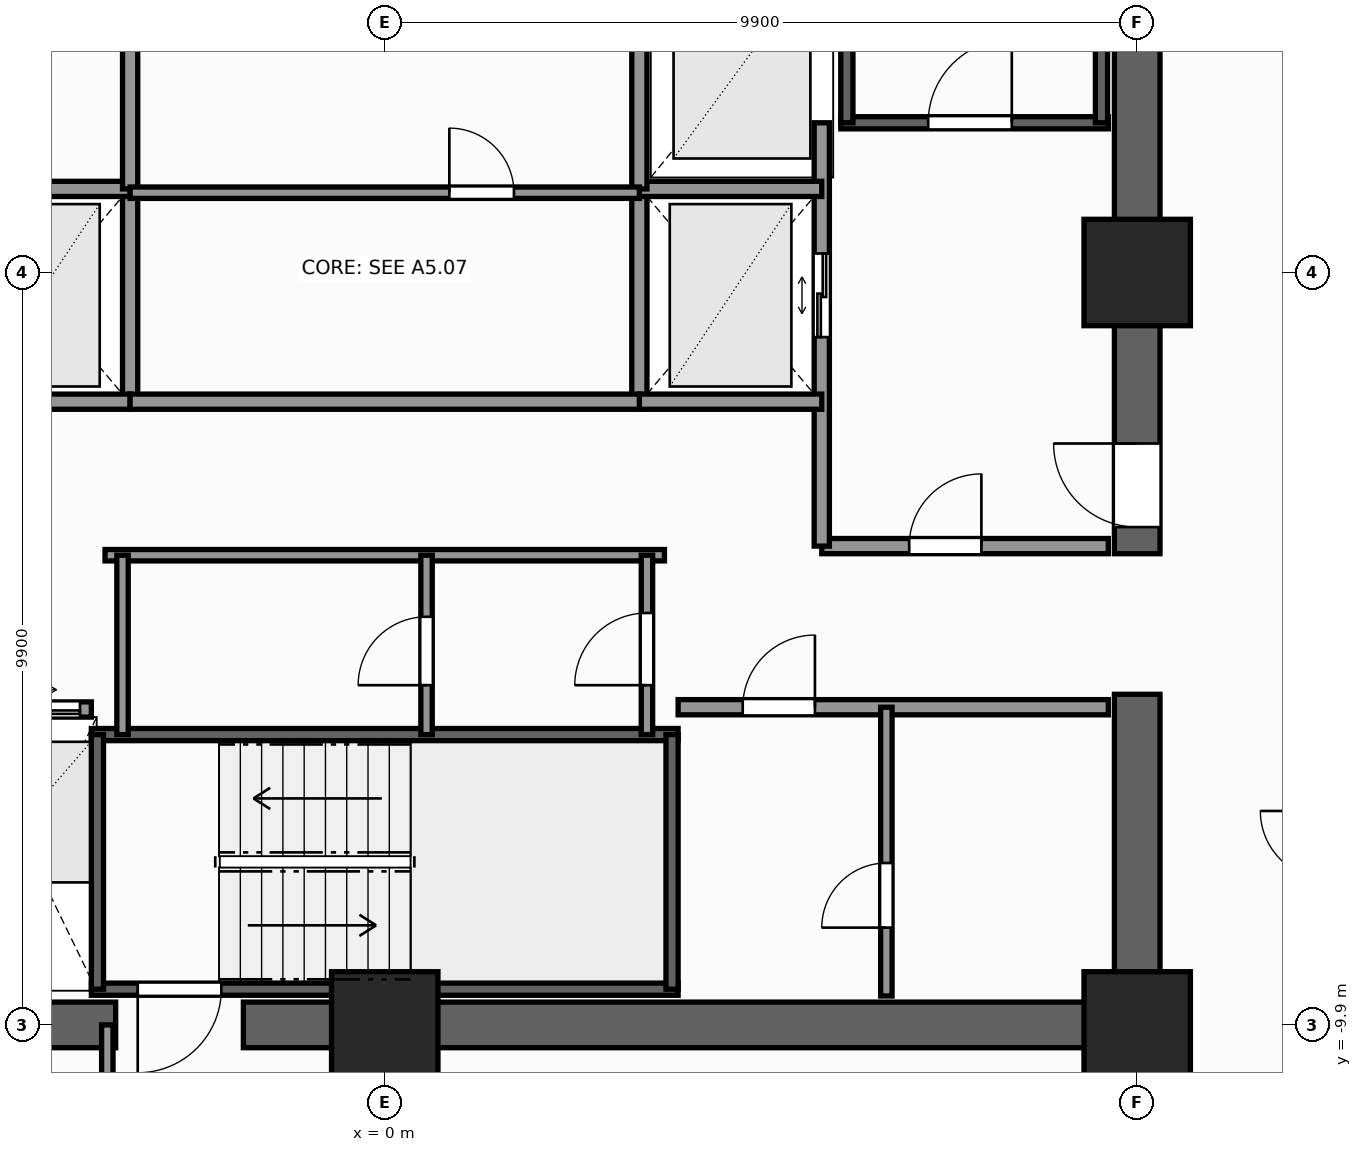
"""IFC4 building model, lengths in metres.
Left out: names, types, materials, properties, quantities, classifications, styles, units other than length and angle.
Written with IfcOpenShell. Run it as: python <this file> out.ifc"""

import sys

from ifc_helpers import new_model, si_unit, direction, frame, frame_2d, origin, origin_2d, place, context, subcontext, project, spatial, rectangle, extrude, element, fill, save


model = new_model("IFC4")
c1 = context("Model", 3, precision=1e-05, world=origin(), true_north=direction((0.0, 1.0)))
c2 = subcontext(c1, "Body", "Model", "MODEL_VIEW")
j1 = project(units=[si_unit("LENGTHUNIT", "METRE"), si_unit("PLANEANGLEUNIT", "RADIAN")], contexts=[c1])
p1 = place(None, origin())
s1 = spatial("IfcSite", under=j1, at=p1, CompositionType="ELEMENT")
p2 = place(p1, origin())
s2 = spatial("IfcBuilding", under=s1, at=p2, CompositionType="ELEMENT")
p3 = place(p2, frame((0.0, 0.0, 88.7)))
s3 = spatial("IfcBuildingStorey", under=s2, at=p3, CompositionType="ELEMENT", Elevation=88.7)
p4 = place(p3, frame((10.2, -9.9, 0.0), z_axis=(0.0, 0.0, 1.0), x_axis=(-1.0, 0.0, 0.0)))
e1 = element("IfcWall", 1, at=p4, inside=s3, PredefinedType="SHEAR", context=c2, shape_type="SweptSolid", body=[
    extrude(rectangle(XDim=12.06, YDim=0.6, at=frame_2d((6.03, 0.0))), origin(), (0.0, 0.0, 1.0), 3.3),
])
p5 = place(p3, frame((-3.54, -9.9, 0.0), z_axis=(0.0, 0.0, 1.0), x_axis=(-1.0, 0.0, 0.0)))
e2 = element("IfcWall", 2, at=p5, inside=s3, PredefinedType="SHEAR", context=c2, shape_type="SweptSolid", body=[
    extrude(rectangle(XDim=6.66, YDim=0.6, at=frame_2d((3.33, 0.0))), origin(), (0.0, 0.0, 1.0), 3.3),
])
p6 = place(p3, frame((9.9, -9.6, 0.0), z_axis=(0.0, 0.0, 1.0), x_axis=(0.0, 1.0, 0.0)))
e3 = element("IfcWall", 3, at=p6, inside=s3, PredefinedType="SHEAR", context=c2, shape_type="SweptSolid", body=[
    extrude(rectangle(XDim=4.05, YDim=0.6, at=frame_2d((2.025, 0.0))), origin(), (0.0, 0.0, 1.0), 3.3),
])
p7 = place(p3, frame((9.9, -3.7, 0.0), z_axis=(0.0, 0.0, 1.0), x_axis=(0.0, 1.0, 0.0)))
e4 = element("IfcWall", 4, at=p7, inside=s3, PredefinedType="SHEAR", context=c2, shape_type="SweptSolid", body=[
    extrude(rectangle(XDim=13.3, YDim=0.6, at=frame_2d((6.65, 0.0))), origin(), (0.0, 0.0, 1.0), 3.3),
])
p8 = place(p7, frame((0.35, 0.0, 0.0)))
e5 = element("IfcOpeningElement", 5, at=p8, cuts=e4, PredefinedType="OPENING", context=c2, shape_type="SweptSolid", body=[
    extrude(rectangle(XDim=1.1, YDim=2.2, at=frame_2d((0.55, 1.1))), frame((0.0, 0.31, 0.0), z_axis=(0.0, -1.0, 0.0), x_axis=(1.0, 0.0, 0.0)), (0.0, 0.0, 1.0), 0.62),
])
for number, where, z_axis, x_axis in (
    (6, (9.9, -9.9, 0.0), (0.0, 0.0, 1.0), (1.0, 0.0, 0.0)),
    (7, (0.0, -9.9, 0.0), (0.0, 0.0, 1.0), (1.0, 0.0, 0.0)),
    (8, (9.9, 0.0, 0.0), (0.0, 0.0, 1.0), (1.0, 0.0, 0.0)),
):
    element("IfcColumn", number, at=place(p3, frame(where, z_axis=z_axis, x_axis=x_axis)), inside=s3, PredefinedType="COLUMN", context=c2, shape_type="SweptSolid", body=[
        extrude(rectangle(XDim=1.4, YDim=1.4, at=origin_2d()), origin(), (0.0, 0.0, 1.0), 3.3),
    ])
p9 = place(p3, frame((6.0, 1.97, 0.0), z_axis=(0.0, 0.0, 1.0), x_axis=(1.0, 0.0, 0.0)))
e9 = element("IfcWall", 9, at=p9, inside=s3, PredefinedType="SHEAR", context=c2, shape_type="SweptSolid", body=[
    extrude(rectangle(XDim=3.52, YDim=0.16, at=frame_2d((1.76, 0.0))), origin(), (0.0, 0.0, 1.0), 3.3),
])
p10 = place(p9, frame((1.15, 0.0, 0.0)))
e10 = element("IfcOpeningElement", 10, at=p10, cuts=e9, PredefinedType="OPENING", context=c2, shape_type="SweptSolid", body=[
    extrude(rectangle(XDim=1.1, YDim=2.2, at=frame_2d((0.55, 1.1))), frame((0.0, 0.09, 0.0), z_axis=(0.0, -1.0, 0.0), x_axis=(1.0, 0.0, 0.0)), (0.0, 0.0, 1.0), 0.18),
])
for number, where, z_axis, x_axis in (
    (11, (6.08, 1.97, 0.0), (0.0, 0.0, 1.0), (0.0, 1.0, 0.0)),
    (12, (9.43, 1.97, 0.0), (0.0, 0.0, 1.0), (0.0, 1.0, 0.0)),
):
    element("IfcWall", number, at=place(p3, frame(where, z_axis=z_axis, x_axis=x_axis)), inside=s3, PredefinedType="SHEAR", context=c2, shape_type="SweptSolid", body=[
        extrude(rectangle(XDim=7.56, YDim=0.16, at=frame_2d((3.78, 0.0))), origin(), (0.0, 0.0, 1.0), 3.3),
    ])
p11 = place(p3, frame((3.86, -9.43, 0.0), z_axis=(0.0, 0.0, 1.0), x_axis=(-1.0, 0.0, 0.0)))
e13 = element("IfcWall", 13, at=p11, inside=s3, PredefinedType="SHEAR", context=c2, shape_type="SweptSolid", body=[
    extrude(rectangle(XDim=7.72, YDim=0.16, at=frame_2d((3.86, 0.0))), origin(), (0.0, 0.0, 1.0), 3.3),
])
p12 = place(p11, frame((6.01, 0.0, 0.0)))
e14 = element("IfcOpeningElement", 14, at=p12, cuts=e13, PredefinedType="OPENING", context=c2, shape_type="SweptSolid", body=[
    extrude(rectangle(XDim=1.1, YDim=2.2, at=frame_2d((0.55, 1.1))), frame((0.0, 0.09, 0.0), z_axis=(0.0, -1.0, 0.0), x_axis=(1.0, 0.0, 0.0)), (0.0, 0.0, 1.0), 0.18),
])
p13 = place(p3, frame((-3.86, -6.08, 0.0), z_axis=(0.0, 0.0, 1.0), x_axis=(1.0, 0.0, 0.0)))
e15 = element("IfcWall", 15, at=p13, inside=s3, PredefinedType="SHEAR", context=c2, shape_type="SweptSolid", body=[
    extrude(rectangle(XDim=7.72, YDim=0.16, at=frame_2d((3.86, 0.0))), origin(), (0.0, 0.0, 1.0), 3.3),
])
for number, where, z_axis, x_axis in (
    (16, (-3.78, -9.43, 0.0), (0.0, 0.0, 1.0), (0.0, 1.0, 0.0)),
    (17, (3.78, -9.43, 0.0), (0.0, 0.0, 1.0), (0.0, 1.0, 0.0)),
):
    element("IfcWall", number, at=place(p3, frame(where, z_axis=z_axis, x_axis=x_axis)), inside=s3, PredefinedType="SHEAR", context=c2, shape_type="SweptSolid", body=[
        extrude(rectangle(XDim=3.35, YDim=0.16, at=frame_2d((1.675, 0.0))), origin(), (0.0, 0.0, 1.0), 3.3),
    ])
p14 = place(p3, frame((-3.35, -1.7, 0.0), z_axis=(0.0, 0.0, 1.0), x_axis=(0.0, 1.0, 0.0)))
e18 = element("IfcWall", 18, at=p14, inside=s3, PredefinedType="SOLIDWALL", context=c2, shape_type="SweptSolid", body=[
    extrude(rectangle(XDim=2.8, YDim=0.2, at=frame_2d((1.4, 0.0))), origin(), (0.0, 0.0, 1.0), 3.08),
])
for number, where, z_axis, x_axis in (
    (19, (-5.75, -1.7, 0.0), (0.0, 0.0, 1.0), (1.0, 0.0, 0.0)),
    (20, (-5.75, 1.1, 0.0), (0.0, 0.0, 1.0), (1.0, 0.0, 0.0)),
):
    element("IfcWall", number, at=place(p3, frame(where, z_axis=z_axis, x_axis=x_axis)), inside=s3, PredefinedType="SOLIDWALL", context=c2, shape_type="SweptSolid", body=[
        extrude(rectangle(XDim=2.4, YDim=0.2, at=frame_2d((1.2, 0.0))), origin(), (0.0, 0.0, 1.0), 3.08),
    ])
p15 = place(p3, frame((5.75, -3.6, 0.0), z_axis=(0.0, 0.0, 1.0), x_axis=(1.0, 0.0, 0.0)))
e21 = element("IfcWall", 21, at=p15, inside=s3, PredefinedType="SOLIDWALL", context=c2, shape_type="SweptSolid", body=[
    extrude(rectangle(XDim=3.77, YDim=0.2, at=frame_2d((1.885, 0.0))), origin(), (0.0, 0.0, 1.0), 3.08),
])
p16 = place(p15, frame((1.15, 0.0, 0.0)))
e22 = element("IfcOpeningElement", 22, at=p16, cuts=e21, PredefinedType="OPENING", context=c2, shape_type="SweptSolid", body=[
    extrude(rectangle(XDim=0.95, YDim=2.06, at=frame_2d((0.475, 1.03))), frame((0.0, 0.11, 0.0), z_axis=(0.0, -1.0, 0.0), x_axis=(1.0, 0.0, 0.0)), (0.0, 0.0, 1.0), 0.22),
])
p17 = place(p3, frame((5.75, -3.6, 0.0), z_axis=(0.0, 0.0, 1.0), x_axis=(0.0, 1.0, 0.0)))
e23 = element("IfcWall", 23, at=p17, inside=s3, PredefinedType="SOLIDWALL", context=c2, shape_type="SweptSolid", body=[
    extrude(rectangle(XDim=5.57, YDim=0.2, at=frame_2d((2.785, 0.0))), origin(), (0.0, 0.0, 1.0), 3.08),
])
p18 = place(p17, frame((2.75, 0.0, 0.0)))
e24 = element("IfcOpeningElement", 24, at=p18, cuts=e23, PredefinedType="OPENING", context=c2, shape_type="SweptSolid", body=[
    extrude(rectangle(XDim=1.1, YDim=2.2, at=frame_2d((0.55, 1.1))), frame((0.0, 0.11, 0.0), z_axis=(0.0, -1.0, 0.0), x_axis=(1.0, 0.0, 0.0)), (0.0, 0.0, 1.0), 0.22),
])
p19 = place(p3, frame((3.35, -1.7, 0.0), z_axis=(0.0, 0.0, 1.0), x_axis=(0.0, 1.0, 0.0)))
e25 = element("IfcWall", 25, at=p19, inside=s3, PredefinedType="SOLIDWALL", context=c2, shape_type="SweptSolid", body=[
    extrude(rectangle(XDim=2.8, YDim=0.2, at=frame_2d((1.4, 0.0))), origin(), (0.0, 0.0, 1.0), 3.08),
])
for number, where, z_axis, x_axis in (
    (26, (3.35, -1.7, 0.0), (0.0, 0.0, 1.0), (1.0, 0.0, 0.0)),
    (27, (3.35, 1.1, 0.0), (0.0, 0.0, 1.0), (1.0, 0.0, 0.0)),
):
    element("IfcWall", number, at=place(p3, frame(where, z_axis=z_axis, x_axis=x_axis)), inside=s3, PredefinedType="SOLIDWALL", context=c2, shape_type="SweptSolid", body=[
        extrude(rectangle(XDim=2.4, YDim=0.2, at=frame_2d((1.2, 0.0))), origin(), (0.0, 0.0, 1.0), 3.08),
    ])
p20 = place(p3, frame((-9.52, -5.75, 0.0), z_axis=(0.0, 0.0, 1.0), x_axis=(1.0, 0.0, 0.0)))
e28 = element("IfcWall", 28, at=p20, inside=s3, PredefinedType="SOLIDWALL", context=c2, shape_type="SweptSolid", body=[
    extrude(rectangle(XDim=5.66, YDim=0.2, at=frame_2d((2.83, 0.0))), origin(), (0.0, 0.0, 1.0), 3.08),
])
p21 = place(p20, frame((0.55, 0.0, 0.0)))
e29 = element("IfcOpeningElement", 29, at=p21, cuts=e28, PredefinedType="OPENING", context=c2, shape_type="SweptSolid", body=[
    extrude(rectangle(XDim=1.1, YDim=2.2, at=frame_2d((0.55, 1.1))), frame((0.0, 0.11, 0.0), z_axis=(0.0, -1.0, 0.0), x_axis=(1.0, 0.0, 0.0)), (0.0, 0.0, 1.0), 0.22),
])
p22 = place(p20, frame((2.48, 0.0, 0.0)))
e30 = element("IfcOpeningElement", 30, at=p22, cuts=e28, PredefinedType="OPENING", context=c2, shape_type="SweptSolid", body=[
    extrude(rectangle(XDim=1.1, YDim=2.2, at=frame_2d((0.55, 1.1))), frame((0.0, 0.11, 0.0), z_axis=(0.0, -1.0, 0.0), x_axis=(1.0, 0.0, 0.0)), (0.0, 0.0, 1.0), 0.22),
])
p23 = place(p20, frame((4.41, 0.0, 0.0)))
e31 = element("IfcOpeningElement", 31, at=p23, cuts=e28, PredefinedType="OPENING", context=c2, shape_type="SweptSolid", body=[
    extrude(rectangle(XDim=1.1, YDim=2.2, at=frame_2d((0.55, 1.1))), frame((0.0, 0.11, 0.0), z_axis=(0.0, -1.0, 0.0), x_axis=(1.0, 0.0, 0.0)), (0.0, 0.0, 1.0), 0.22),
])
p24 = place(p3, frame((3.86, -5.72, 0.0), z_axis=(0.0, 0.0, 1.0), x_axis=(1.0, 0.0, 0.0)))
e32 = element("IfcWall", 32, at=p24, inside=s3, PredefinedType="SOLIDWALL", context=c2, shape_type="SweptSolid", body=[
    extrude(rectangle(XDim=5.66, YDim=0.2, at=frame_2d((2.83, 0.0))), origin(), (0.0, 0.0, 1.0), 3.08),
])
p25 = place(p24, frame((0.85, 0.0, 0.0)))
e33 = element("IfcOpeningElement", 33, at=p25, cuts=e32, PredefinedType="OPENING", context=c2, shape_type="SweptSolid", body=[
    extrude(rectangle(XDim=0.95, YDim=2.06, at=frame_2d((0.475, 1.03))), frame((0.0, 0.11, 0.0), z_axis=(0.0, -1.0, 0.0), x_axis=(1.0, 0.0, 0.0)), (0.0, 0.0, 1.0), 0.22),
])
p26 = place(p3, frame((6.6, -9.52, 0.0), z_axis=(0.0, 0.0, 1.0), x_axis=(0.0, 1.0, 0.0)))
e34 = element("IfcWall", 34, at=p26, inside=s3, PredefinedType="PARTITIONING", context=c2, shape_type="SweptSolid", body=[
    extrude(rectangle(XDim=3.8, YDim=0.15, at=frame_2d((1.9, 0.0))), origin(), (0.0, 0.0, 1.0), 3.08),
])
p27 = place(p26, frame((0.9, 0.0, 0.0)))
e35 = element("IfcOpeningElement", 35, at=p27, cuts=e34, PredefinedType="OPENING", context=c2, shape_type="SweptSolid", body=[
    extrude(rectangle(XDim=0.85, YDim=2.03, at=frame_2d((0.425, 1.015))), frame((0.0, 0.085, 0.0), z_axis=(0.0, -1.0, 0.0), x_axis=(1.0, 0.0, 0.0)), (0.0, 0.0, 1.0), 0.17),
])
p28 = place(p3, frame((-3.35, -1.7, 0.0), z_axis=(0.0, 0.0, 1.0), x_axis=(1.0, 0.0, 0.0)))
e36 = element("IfcWall", 36, at=p28, inside=s3, PredefinedType="SOLIDWALL", context=c2, shape_type="SweptSolid", body=[
    extrude(rectangle(XDim=6.7, YDim=0.2, at=frame_2d((3.35, 0.0))), origin(), (0.0, 0.0, 1.0), 3.08),
])
for number, where, z_axis, x_axis in (
    (37, (-3.35, 1.1, 0.0), (0.0, 0.0, 1.0), (0.0, 1.0, 0.0)),
    (38, (3.35, 1.1, 0.0), (0.0, 0.0, 1.0), (0.0, 1.0, 0.0)),
):
    element("IfcWall", number, at=place(p3, frame(where, z_axis=z_axis, x_axis=x_axis)), inside=s3, PredefinedType="SOLIDWALL", context=c2, shape_type="SweptSolid", body=[
        extrude(rectangle(XDim=3.2, YDim=0.2, at=frame_2d((1.6, 0.0))), origin(), (0.0, 0.0, 1.0), 3.08),
    ])
p29 = place(p3, frame((-3.35, 1.05, 0.0), z_axis=(0.0, 0.0, 1.0), x_axis=(1.0, 0.0, 0.0)))
e39 = element("IfcWall", 39, at=p29, inside=s3, PredefinedType="PARTITIONING", context=c2, shape_type="SweptSolid", body=[
    extrude(rectangle(XDim=6.7, YDim=0.15, at=frame_2d((3.35, 0.0))), origin(), (0.0, 0.0, 1.0), 3.08),
])
p30 = place(p29, frame((4.2, 0.0, 0.0)))
e40 = element("IfcOpeningElement", 40, at=p30, cuts=e39, PredefinedType="OPENING", context=c2, shape_type="SweptSolid", body=[
    extrude(rectangle(XDim=0.85, YDim=2.03, at=frame_2d((0.425, 1.015))), frame((0.0, 0.085, 0.0), z_axis=(0.0, -1.0, 0.0), x_axis=(1.0, 0.0, 0.0)), (0.0, 0.0, 1.0), 0.17),
])
p31 = place(p3, frame((-3.68, -3.72, 0.0), z_axis=(0.0, 0.0, 1.0), x_axis=(1.0, 0.0, 0.0)))
e41 = element("IfcWall", 41, at=p31, inside=s3, PredefinedType="PARTITIONING", context=c2, shape_type="SweptSolid", body=[
    extrude(rectangle(XDim=7.36, YDim=0.15, at=frame_2d((3.68, 0.0))), origin(), (0.0, 0.0, 1.0), 3.08),
])
p32 = place(p3, frame((3.45, -6.08, 0.0), z_axis=(0.0, 0.0, 1.0), x_axis=(0.0, 1.0, 0.0)))
e42 = element("IfcWall", 42, at=p32, inside=s3, PredefinedType="PARTITIONING", context=c2, shape_type="SweptSolid", body=[
    extrude(rectangle(XDim=2.36, YDim=0.15, at=frame_2d((1.18, 0.0))), origin(), (0.0, 0.0, 1.0), 3.08),
])
p33 = place(p32, frame((0.65, 0.0, 0.0)))
e43 = element("IfcOpeningElement", 43, at=p33, cuts=e42, PredefinedType="OPENING", context=c2, shape_type="SweptSolid", body=[
    extrude(rectangle(XDim=0.95, YDim=2.06, at=frame_2d((0.475, 1.03))), frame((0.0, 0.085, 0.0), z_axis=(0.0, -1.0, 0.0), x_axis=(1.0, 0.0, 0.0)), (0.0, 0.0, 1.0), 0.17),
])
p34 = place(p3, frame((-3.45, -6.08, 0.0), z_axis=(0.0, 0.0, 1.0), x_axis=(0.0, 1.0, 0.0)))
e44 = element("IfcWall", 44, at=p34, inside=s3, PredefinedType="PARTITIONING", context=c2, shape_type="SweptSolid", body=[
    extrude(rectangle(XDim=2.36, YDim=0.15, at=frame_2d((1.18, 0.0))), origin(), (0.0, 0.0, 1.0), 3.08),
])
p35 = place(p3, frame((0.55, -6.08, 0.0), z_axis=(0.0, 0.0, 1.0), x_axis=(0.0, 1.0, 0.0)))
e45 = element("IfcWall", 45, at=p35, inside=s3, PredefinedType="PARTITIONING", context=c2, shape_type="SweptSolid", body=[
    extrude(rectangle(XDim=2.36, YDim=0.15, at=frame_2d((1.18, 0.0))), origin(), (0.0, 0.0, 1.0), 3.08),
])
p36 = place(p35, frame((0.65, 0.0, 0.0)))
e46 = element("IfcOpeningElement", 46, at=p36, cuts=e45, PredefinedType="OPENING", context=c2, shape_type="SweptSolid", body=[
    extrude(rectangle(XDim=0.9, YDim=2.06, at=frame_2d((0.45, 1.03))), frame((0.0, 0.085, 0.0), z_axis=(0.0, -1.0, 0.0), x_axis=(1.0, 0.0, 0.0)), (0.0, 0.0, 1.0), 0.17),
])
p37 = place(p3, frame((-3.65, -12.42, 0.0), z_axis=(0.0, 0.0, 1.0), x_axis=(0.0, 1.0, 0.0)))
e47 = element("IfcWall", 47, at=p37, inside=s3, PredefinedType="PARTITIONING", context=c2, shape_type="SweptSolid", body=[
    extrude(rectangle(XDim=2.52, YDim=0.15, at=frame_2d((1.26, 0.0))), origin(), (0.0, 0.0, 1.0), 3.08),
])
p38 = place(p10, origin())
e48 = element("IfcDoor", 48, at=p38, inside=s3, OperationType="SINGLE_SWING_RIGHT", PredefinedType="DOOR", context=c2, shape_type="SweptSolid", body=[
    extrude(rectangle(XDim=1.1, YDim=2.2, at=frame_2d((0.55, 1.1))), frame((0.0, 0.025, 0.0), z_axis=(0.0, -1.0, 0.0), x_axis=(1.0, 0.0, 0.0)), (0.0, 0.0, 1.0), 0.05),
])
fill(e10, e48)
p39 = place(p12, origin())
e49 = element("IfcDoor", 49, at=p39, inside=s3, OperationType="SINGLE_SWING_RIGHT", PredefinedType="DOOR", context=c2, shape_type="SweptSolid", body=[
    extrude(rectangle(XDim=1.1, YDim=2.2, at=frame_2d((0.55, 1.1))), frame((0.0, 0.025, 0.0), z_axis=(0.0, -1.0, 0.0), x_axis=(1.0, 0.0, 0.0)), (0.0, 0.0, 1.0), 0.05),
])
fill(e14, e49)
p40 = place(p8, origin())
e50 = element("IfcDoor", 50, at=p40, inside=s3, OperationType="SINGLE_SWING_RIGHT", PredefinedType="DOOR", context=c2, shape_type="SweptSolid", body=[
    extrude(rectangle(XDim=1.1, YDim=2.2, at=frame_2d((0.55, 1.1))), frame((0.0, 0.025, 0.0), z_axis=(0.0, -1.0, 0.0), x_axis=(1.0, 0.0, 0.0)), (0.0, 0.0, 1.0), 0.05),
])
fill(e5, e50)
p41 = place(p18, origin())
e51 = element("IfcDoor", 51, at=p41, inside=s3, OperationType="DOUBLE_DOOR_SLIDING", PredefinedType="DOOR", context=c2, shape_type="SweptSolid", body=[
    extrude(rectangle(XDim=1.1, YDim=2.2, at=frame_2d((0.55, 1.1))), frame((0.0, 0.025, 0.0), z_axis=(0.0, -1.0, 0.0), x_axis=(1.0, 0.0, 0.0)), (0.0, 0.0, 1.0), 0.05),
])
fill(e24, e51)
p42 = place(p23, origin())
e52 = element("IfcDoor", 52, at=p42, inside=s3, OperationType="DOUBLE_DOOR_SLIDING", PredefinedType="DOOR", context=c2, shape_type="SweptSolid", body=[
    extrude(rectangle(XDim=1.1, YDim=2.2, at=frame_2d((0.55, 1.1))), frame((0.0, 0.025, 0.0), z_axis=(0.0, -1.0, 0.0), x_axis=(1.0, 0.0, 0.0)), (0.0, 0.0, 1.0), 0.05),
])
fill(e31, e52)
p43 = place(p25, origin())
e53 = element("IfcDoor", 53, at=p43, inside=s3, OperationType="SINGLE_SWING_RIGHT", PredefinedType="DOOR", context=c2, shape_type="SweptSolid", body=[
    extrude(rectangle(XDim=0.95, YDim=2.06, at=frame_2d((0.475, 1.03))), frame((0.0, 0.025, 0.0), z_axis=(0.0, -1.0, 0.0), x_axis=(1.0, 0.0, 0.0)), (0.0, 0.0, 1.0), 0.05),
])
fill(e33, e53)
p44 = place(p27, origin())
e54 = element("IfcDoor", 54, at=p44, inside=s3, OperationType="SINGLE_SWING_LEFT", PredefinedType="DOOR", context=c2, shape_type="SweptSolid", body=[
    extrude(rectangle(XDim=0.85, YDim=2.03, at=frame_2d((0.425, 1.015))), frame((0.0, 0.025, 0.0), z_axis=(0.0, -1.0, 0.0), x_axis=(1.0, 0.0, 0.0)), (0.0, 0.0, 1.0), 0.05),
])
fill(e35, e54)
p45 = place(p16, origin())
e55 = element("IfcDoor", 55, at=p45, inside=s3, OperationType="SINGLE_SWING_RIGHT", PredefinedType="DOOR", context=c2, shape_type="SweptSolid", body=[
    extrude(rectangle(XDim=0.95, YDim=2.06, at=frame_2d((0.475, 1.03))), frame((0.0, 0.025, 0.0), z_axis=(0.0, -1.0, 0.0), x_axis=(1.0, 0.0, 0.0)), (0.0, 0.0, 1.0), 0.05),
])
fill(e22, e55)
p46 = place(p30, origin())
e56 = element("IfcDoor", 56, at=p46, inside=s3, OperationType="SINGLE_SWING_LEFT", PredefinedType="DOOR", context=c2, shape_type="SweptSolid", body=[
    extrude(rectangle(XDim=0.85, YDim=2.03, at=frame_2d((0.425, 1.015))), frame((0.0, 0.025, 0.0), z_axis=(0.0, -1.0, 0.0), x_axis=(1.0, 0.0, 0.0)), (0.0, 0.0, 1.0), 0.05),
])
fill(e40, e56)
p47 = place(p33, origin())
e57 = element("IfcDoor", 57, at=p47, inside=s3, OperationType="SINGLE_SWING_LEFT", PredefinedType="DOOR", context=c2, shape_type="SweptSolid", body=[
    extrude(rectangle(XDim=0.95, YDim=2.06, at=frame_2d((0.475, 1.03))), frame((0.0, 0.025, 0.0), z_axis=(0.0, -1.0, 0.0), x_axis=(1.0, 0.0, 0.0)), (0.0, 0.0, 1.0), 0.05),
])
fill(e43, e57)
p48 = place(p36, origin())
e58 = element("IfcDoor", 58, at=p48, inside=s3, OperationType="SINGLE_SWING_LEFT", PredefinedType="DOOR", context=c2, shape_type="SweptSolid", body=[
    extrude(rectangle(XDim=0.9, YDim=2.06, at=frame_2d((0.45, 1.03))), frame((0.0, 0.025, 0.0), z_axis=(0.0, -1.0, 0.0), x_axis=(1.0, 0.0, 0.0)), (0.0, 0.0, 1.0), 0.05),
])
fill(e46, e58)
save(model, sys.argv[1])
